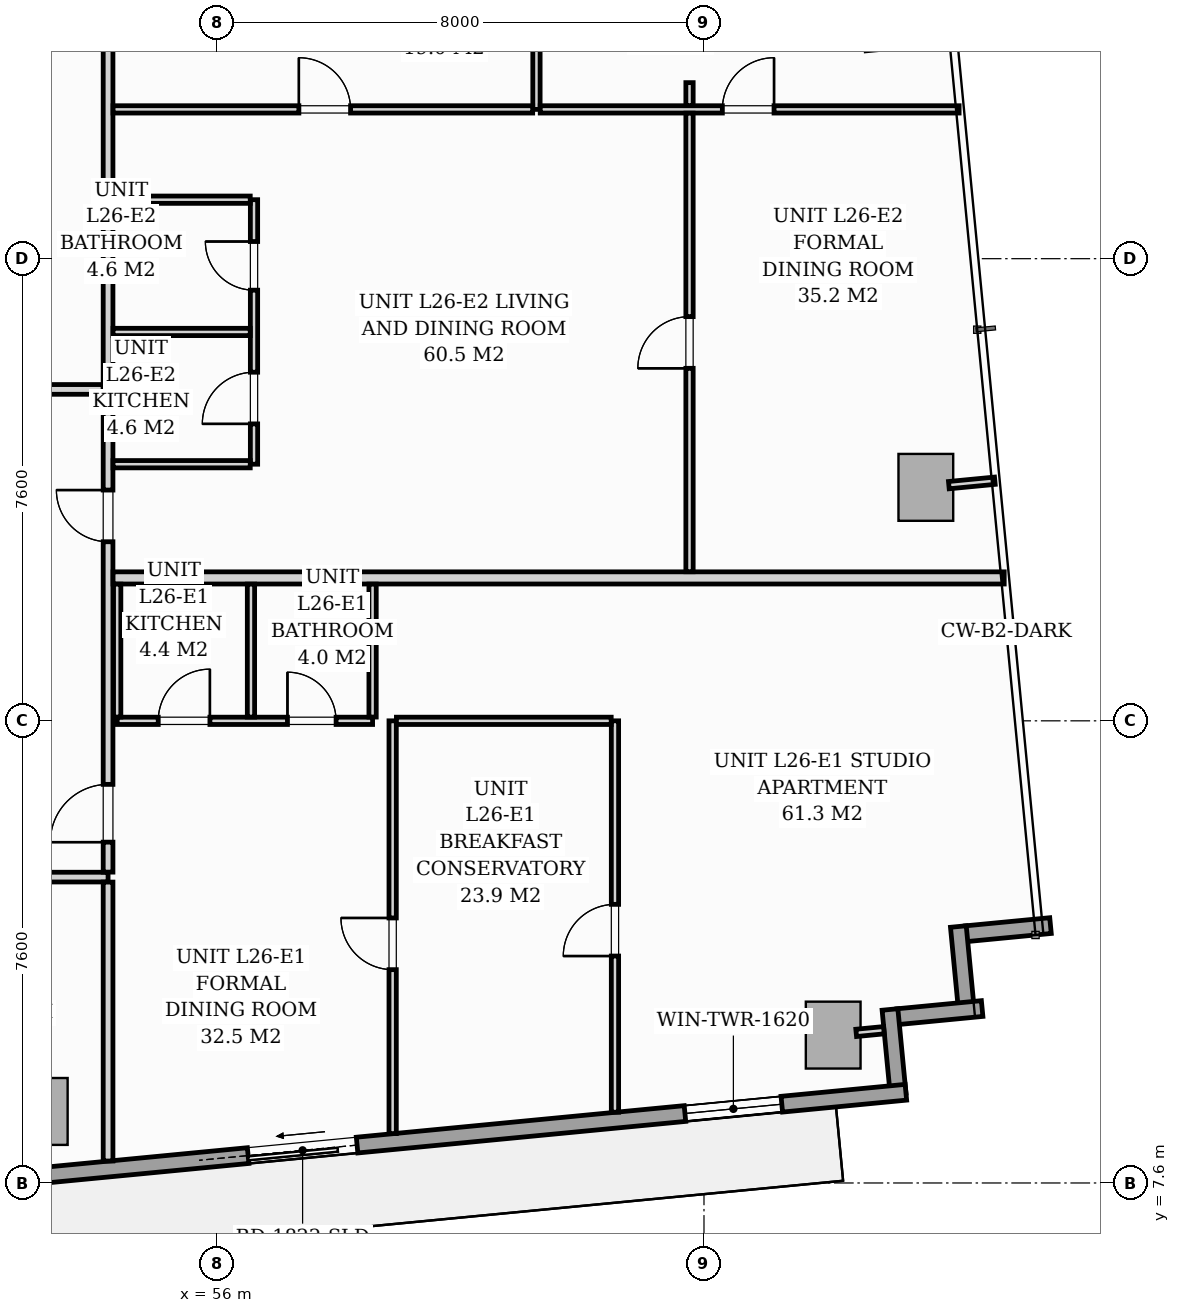
"""IFC4 building model, lengths in metres.
Left out: names, types, materials, properties, quantities, classifications, styles, units other than length and angle.
Written with IfcOpenShell. Run it as: python <this file> out.ifc"""

import sys

from ifc_helpers import new_model, si_unit, direction, frame, frame_2d, origin, origin_2d, place, context, subcontext, project, spatial, rectangle, extrude, source, transform, mapped, element, fill, save


model = new_model("IFC4")
c1 = context("Model", 3, precision=1e-05, world=origin(), true_north=direction((0.0, 1.0)))
c2 = subcontext(c1, "Body", "Model", "MODEL_VIEW")
j1 = project(units=[si_unit("LENGTHUNIT", "METRE"), si_unit("PLANEANGLEUNIT", "RADIAN")], contexts=[c1])
p1 = place(None, origin())
s1 = spatial("IfcSite", under=j1, at=p1, CompositionType="ELEMENT")
p2 = place(p1, origin())
s2 = spatial("IfcBuilding", under=s1, at=p2, CompositionType="ELEMENT")
p3 = place(p2, frame((0.0, 0.0, 93.8)))
s3 = spatial("IfcBuildingStorey", under=s2, at=p3, CompositionType="ELEMENT", Elevation=93.8)
m1 = source(origin(), c2, "Body", "SweptSolid", [
    extrude(rectangle(XDim=0.9, YDim=1.1, at=origin_2d()), origin(), (0.0, 0.0, 1.0), 3.196),
])
for number, where, z_axis, x_axis in (
    (1, (53.085, 8.776, 0.002), (0.0, 0.0, 1.0), (0.995, 0.096, 0.0)),
    (2, (66.125, 10.032, 0.002), (0.0, 0.0, 1.0), (0.995, 0.096, 0.0)),
    (3, (67.648, 19.039, 0.002), (0.0, 0.0, 1.0), (0.995, 0.096, 0.0)),
):
    element("IfcColumn", number, at=place(p3, frame(where, z_axis=z_axis, x_axis=x_axis)), inside=s3, PredefinedType="COLUMN", context=c2, shape_type="MappedRepresentation", body=[
        mapped(m1, transform((0.0, 0.0, 0.0), scale=1.0)),
    ])
for number, where, z_axis, x_axis in (
    (4, (69.698, 11.833, 0.0), (0.0, 0.0, 1.0), (-0.995, -0.096, 0.0)),
    (5, (68.183, 11.817, 0.0), (0.0, 0.0, 1.0), (0.096, -0.995, 0.0)),
):
    element("IfcWall", number, at=place(p3, frame(where, z_axis=z_axis, x_axis=x_axis)), inside=s3, PredefinedType="STANDARD", context=c2, shape_type="SweptSolid", body=[
        extrude(rectangle(XDim=1.395, YDim=0.26, at=frame_2d((0.697, 0.0))), origin(), (0.0, 0.0, 1.0), 2.94),
    ])
p4 = place(p3, frame((68.574, 10.469, 0.0), z_axis=(0.0, 0.0, 1.0), x_axis=(-0.99540774648, -0.095725744959, 0.0)))
e6 = element("IfcWall", 6, at=p4, inside=s3, PredefinedType="STANDARD", context=c2, shape_type="SweptSolid", body=[
    extrude(rectangle(XDim=1.395, YDim=0.26, at=frame_2d((0.698, 0.0))), origin(), (0.0, 0.0, 1.0), 2.94),
])
p5 = place(p3, frame((67.059, 10.453, 0.0), z_axis=(0.0, 0.0, 1.0), x_axis=(0.095915846097, -0.995389446633, 0.0)))
e7 = element("IfcWall", 7, at=p5, inside=s3, PredefinedType="STANDARD", context=c2, shape_type="SweptSolid", body=[
    extrude(rectangle(XDim=1.395, YDim=0.26, at=frame_2d((0.697, 0.0))), origin(), (0.0, 0.0, 1.0), 2.94),
])
p6 = place(p3, frame((67.32, 9.092, 0.0), z_axis=(0.0, 0.0, 1.0), x_axis=(-0.995396521236, -0.095842399342, 0.0)))
e8 = element("IfcWall", 8, at=p6, inside=s3, PredefinedType="STANDARD", context=c2, shape_type="SweptSolid", body=[
    extrude(rectangle(XDim=19.11, YDim=0.26, at=frame_2d((9.555, 0.0))), origin(), (0.0, 0.0, 1.0), 2.94),
])
p7 = place(p6, frame((9.067, 0.0, 0.0)))
e9 = element("IfcOpeningElement", 9, at=p7, cuts=e8, PredefinedType="OPENING", context=c2, shape_type="SweptSolid", body=[
    extrude(rectangle(XDim=1.8, YDim=2.06, at=frame_2d((0.9, 1.03))), frame((0.0, 0.14, 0.0), z_axis=(0.0, -1.0, 0.0), x_axis=(1.0, 0.0, 0.0)), (0.0, 0.0, 1.0), 0.28),
])
p8 = place(p6, frame((2.05, 0.0, 0.65)))
e10 = element("IfcOpeningElement", 10, at=p8, cuts=e8, PredefinedType="OPENING", context=c2, shape_type="SweptSolid", body=[
    extrude(rectangle(XDim=1.6, YDim=1.5, at=frame_2d((0.8, 0.75))), frame((0.0, 0.14, 0.0), z_axis=(0.0, -1.0, 0.0), x_axis=(1.0, 0.0, 0.0)), (0.0, 0.0, 1.0), 0.28),
])
p9 = place(p6, frame((14.438, 0.0, 0.75)))
e11 = element("IfcOpeningElement", 11, at=p9, cuts=e8, PredefinedType="OPENING", context=c2, shape_type="SweptSolid", body=[
    extrude(rectangle(XDim=1.6, YDim=1.5, at=frame_2d((0.8, 0.75))), frame((0.0, 0.14, 0.0), z_axis=(0.0, -1.0, 0.0), x_axis=(1.0, 0.0, 0.0)), (0.0, 0.0, 1.0), 0.28),
])
p10 = place(p3, frame((16.6, 12.63, 0.0), z_axis=(0.0, 0.0, 1.0), x_axis=(1.0, 0.0, 0.0)))
e12 = element("IfcWall", 12, at=p10, inside=s3, PredefinedType="PARTITIONING", context=c2, shape_type="SweptSolid", body=[
    extrude(rectangle(XDim=37.6, YDim=0.16, at=frame_2d((18.8, 0.0))), origin(), (0.0, 0.0, 1.0), 2.94),
])
p11 = place(p10, frame((1.626, 0.0, 0.0)))
e13 = element("IfcOpeningElement", 13, at=p11, cuts=e12, PredefinedType="OPENING", context=c2, shape_type="SweptSolid", body=[
    extrude(rectangle(XDim=0.95, YDim=2.06, at=frame_2d((0.475, 1.03))), frame((0.0, 0.09, 0.0), z_axis=(0.0, -1.0, 0.0), x_axis=(1.0, 0.0, 0.0)), (0.0, 0.0, 1.0), 0.18),
])
p12 = place(p10, frame((13.46, 0.0, 0.0)))
e14 = element("IfcOpeningElement", 14, at=p12, cuts=e12, PredefinedType="OPENING", context=c2, shape_type="SweptSolid", body=[
    extrude(rectangle(XDim=0.95, YDim=2.06, at=frame_2d((0.475, 1.03))), frame((0.0, 0.09, 0.0), z_axis=(0.0, -1.0, 0.0), x_axis=(1.0, 0.0, 0.0)), (0.0, 0.0, 1.0), 0.18),
])
p13 = place(p10, frame((26.522, 0.0, 0.0)))
e15 = element("IfcOpeningElement", 15, at=p13, cuts=e12, PredefinedType="OPENING", context=c2, shape_type="SweptSolid", body=[
    extrude(rectangle(XDim=0.95, YDim=2.06, at=frame_2d((0.475, 1.03))), frame((0.0, 0.09, 0.0), z_axis=(0.0, -1.0, 0.0), x_axis=(1.0, 0.0, 0.0)), (0.0, 0.0, 1.0), 0.18),
])
p14 = place(p3, frame((54.2, 7.961, 0.0), z_axis=(0.0, 0.0, 1.0), x_axis=(0.0, 1.0, 0.0)))
e16 = element("IfcWall", 16, at=p14, inside=s3, PredefinedType="PARTITIONING", context=c2, shape_type="SweptSolid", body=[
    extrude(rectangle(XDim=4.587, YDim=0.16, at=frame_2d((2.293, 0.0))), origin(), (0.0, 0.0, 1.0), 2.94),
])
p15 = place(p3, frame((54.2, 12.712, 0.0), z_axis=(0.0, 0.0, 1.0), x_axis=(0.0, 1.0, 0.0)))
e17 = element("IfcWall", 17, at=p15, inside=s3, PredefinedType="PARTITIONING", context=c2, shape_type="SweptSolid", body=[
    extrude(rectangle(XDim=14.815, YDim=0.16, at=frame_2d((7.408, 0.0))), origin(), (0.0, 0.0, 1.0), 2.94),
])
p16 = place(p15, frame((0.493, 0.0, 0.0)))
e18 = element("IfcOpeningElement", 18, at=p16, cuts=e17, PredefinedType="OPENING", context=c2, shape_type="SweptSolid", body=[
    extrude(rectangle(XDim=0.95, YDim=2.06, at=frame_2d((0.475, 1.03))), frame((0.0, 0.09, 0.0), z_axis=(0.0, -1.0, 0.0), x_axis=(1.0, 0.0, 0.0)), (0.0, 0.0, 1.0), 0.18),
])
p17 = place(p15, frame((5.433, 0.0, 0.0)))
e19 = element("IfcOpeningElement", 19, at=p17, cuts=e17, PredefinedType="OPENING", context=c2, shape_type="SweptSolid", body=[
    extrude(rectangle(XDim=0.85, YDim=2.0, at=frame_2d((0.425, 1.0))), frame((0.0, 0.09, 0.0), z_axis=(0.0, -1.0, 0.0), x_axis=(1.0, 0.0, 0.0)), (0.0, 0.0, 1.0), 0.18),
])
p18 = place(p3, frame((54.282, 17.55, 0.0), z_axis=(0.0, 0.0, 1.0), x_axis=(1.0, 0.0, 0.0)))
e20 = element("IfcWall", 20, at=p18, inside=s3, PredefinedType="PARTITIONING", context=c2, shape_type="SweptSolid", body=[
    extrude(rectangle(XDim=14.655, YDim=0.2, at=frame_2d((7.328, 0.0))), origin(), (0.0, 0.0, 1.0), 2.94),
])
p19 = place(p3, frame((54.35, 15.2, 0.0), z_axis=(0.0, 0.0, 1.0), x_axis=(1.0, 0.0, 0.0)))
e21 = element("IfcWall", 21, at=p19, inside=s3, PredefinedType="PARTITIONING", context=c2, shape_type="SweptSolid", body=[
    extrude(rectangle(XDim=4.2, YDim=0.12, at=frame_2d((2.1, 0.0))), origin(), (0.0, 0.0, 1.0), 2.94),
])
p20 = place(p19, frame((0.675, 0.0, 0.0)))
e22 = element("IfcOpeningElement", 22, at=p20, cuts=e21, PredefinedType="OPENING", context=c2, shape_type="SweptSolid", body=[
    extrude(rectangle(XDim=0.85, YDim=2.05, at=frame_2d((0.425, 1.025))), frame((0.0, 0.07, 0.0), z_axis=(0.0, -1.0, 0.0), x_axis=(1.0, 0.0, 0.0)), (0.0, 0.0, 1.0), 0.14),
])
p21 = place(p19, frame((2.8, 0.0, 0.0)))
e23 = element("IfcOpeningElement", 23, at=p21, cuts=e21, PredefinedType="OPENING", context=c2, shape_type="SweptSolid", body=[
    extrude(rectangle(XDim=0.8, YDim=2.02, at=frame_2d((0.4, 1.01))), frame((0.0, 0.07, 0.0), z_axis=(0.0, -1.0, 0.0), x_axis=(1.0, 0.0, 0.0)), (0.0, 0.0, 1.0), 0.14),
])
for number, where, z_axis, x_axis in (
    (24, (54.35, 15.262, 0.0), (0.0, 0.0, 1.0), (0.0, 1.0, 0.0)),
    (25, (56.55, 15.262, 0.0), (0.0, 0.0, 1.0), (0.0, 1.0, 0.0)),
    (26, (58.55, 15.262, 0.0), (0.0, 0.0, 1.0), (0.0, 1.0, 0.0)),
):
    element("IfcWall", number, at=place(p3, frame(where, z_axis=z_axis, x_axis=x_axis)), inside=s3, PredefinedType="PARTITIONING", context=c2, shape_type="SweptSolid", body=[
        extrude(rectangle(XDim=2.186, YDim=0.12, at=frame_2d((1.093, 0.0))), origin(), (0.0, 0.0, 1.0), 2.94),
    ])
p22 = place(p3, frame((58.88, 8.412, 0.0), z_axis=(0.0, 0.0, 1.0), x_axis=(0.0, 1.0, 0.0)))
e27 = element("IfcWall", 27, at=p22, inside=s3, PredefinedType="PARTITIONING", context=c2, shape_type="SweptSolid", body=[
    extrude(rectangle(XDim=6.788, YDim=0.12, at=frame_2d((3.394, 0.0))), origin(), (0.0, 0.0, 1.0), 2.94),
])
p23 = place(p22, frame((2.696, 0.0, 0.0)))
e28 = element("IfcOpeningElement", 28, at=p23, cuts=e27, PredefinedType="OPENING", context=c2, shape_type="SweptSolid", body=[
    extrude(rectangle(XDim=0.85, YDim=2.05, at=frame_2d((0.425, 1.025))), frame((0.0, 0.07, 0.0), z_axis=(0.0, -1.0, 0.0), x_axis=(1.0, 0.0, 0.0)), (0.0, 0.0, 1.0), 0.14),
])
p24 = place(p3, frame((62.536, 8.764, 0.0), z_axis=(0.0, 0.0, 1.0), x_axis=(0.0, 1.0, 0.0)))
e29 = element("IfcWall", 29, at=p24, inside=s3, PredefinedType="PARTITIONING", context=c2, shape_type="SweptSolid", body=[
    extrude(rectangle(XDim=6.436, YDim=0.12, at=frame_2d((3.218, 0.0))), origin(), (0.0, 0.0, 1.0), 2.94),
])
p25 = place(p24, frame((2.568, 0.0, 0.0)))
e30 = element("IfcOpeningElement", 30, at=p25, cuts=e29, PredefinedType="OPENING", context=c2, shape_type="SweptSolid", body=[
    extrude(rectangle(XDim=0.85, YDim=2.05, at=frame_2d((0.425, 1.025))), frame((0.0, 0.07, 0.0), z_axis=(0.0, -1.0, 0.0), x_axis=(1.0, 0.0, 0.0)), (0.0, 0.0, 1.0), 0.14),
])
p26 = place(p3, frame((58.942, 15.2, 0.0), z_axis=(0.0, 0.0, 1.0), x_axis=(1.0, 0.0, 0.0)))
e31 = element("IfcWall", 31, at=p26, inside=s3, PredefinedType="PARTITIONING", context=c2, shape_type="SweptSolid", body=[
    extrude(rectangle(XDim=3.532, YDim=0.12, at=frame_2d((1.766, 0.0))), origin(), (0.0, 0.0, 1.0), 2.94),
])
p27 = place(p3, frame((56.6, 19.42, 0.0), z_axis=(0.0, 0.0, 1.0), x_axis=(0.0, 1.0, 0.0)))
e32 = element("IfcWall", 32, at=p27, inside=s3, PredefinedType="PARTITIONING", context=c2, shape_type="SweptSolid", body=[
    extrude(rectangle(XDim=4.35, YDim=0.12, at=frame_2d((2.175, 0.0))), origin(), (0.0, 0.0, 1.0), 2.94),
])
p28 = place(p27, frame((0.663, 0.0, 0.0)))
e33 = element("IfcOpeningElement", 33, at=p28, cuts=e32, PredefinedType="OPENING", context=c2, shape_type="SweptSolid", body=[
    extrude(rectangle(XDim=0.85, YDim=2.05, at=frame_2d((0.425, 1.025))), frame((0.0, 0.07, 0.0), z_axis=(0.0, -1.0, 0.0), x_axis=(1.0, 0.0, 0.0)), (0.0, 0.0, 1.0), 0.14),
])
p29 = place(p27, frame((2.862, 0.0, 0.0)))
e34 = element("IfcOpeningElement", 34, at=p29, cuts=e32, PredefinedType="OPENING", context=c2, shape_type="SweptSolid", body=[
    extrude(rectangle(XDim=0.8, YDim=2.02, at=frame_2d((0.4, 1.01))), frame((0.0, 0.07, 0.0), z_axis=(0.0, -1.0, 0.0), x_axis=(1.0, 0.0, 0.0)), (0.0, 0.0, 1.0), 0.14),
])
for number, where, z_axis, x_axis in (
    (35, (54.282, 21.595, 0.0), (0.0, 0.0, 1.0), (1.0, 0.0, 0.0)),
    (36, (54.282, 19.42, 0.0), (0.0, 0.0, 1.0), (1.0, 0.0, 0.0)),
    (37, (54.282, 23.77, 0.0), (0.0, 0.0, 1.0), (1.0, 0.0, 0.0)),
):
    element("IfcWall", number, at=place(p3, frame(where, z_axis=z_axis, x_axis=x_axis)), inside=s3, PredefinedType="PARTITIONING", context=c2, shape_type="SweptSolid", body=[
        extrude(rectangle(XDim=2.256, YDim=0.12, at=frame_2d((1.128, 0.0))), origin(), (0.0, 0.0, 1.0), 2.94),
    ])
p30 = place(p3, frame((61.245, 25.255, 0.0), z_axis=(0.0, 0.0, 1.0), x_axis=(0.0, 1.0, 0.0)))
e38 = element("IfcWall", 38, at=p30, inside=s3, PredefinedType="PARTITIONING", context=c2, shape_type="SweptSolid", body=[
    extrude(rectangle(XDim=2.951, YDim=0.12, at=frame_2d((1.476, 0.0))), origin(), (0.0, 0.0, 1.0), 2.94),
])
p31 = place(p3, frame((54.282, 25.255, 0.0), z_axis=(0.0, 0.0, 1.0), x_axis=(1.0, 0.0, 0.0)))
e39 = element("IfcWall", 39, at=p31, inside=s3, PredefinedType="PARTITIONING", context=c2, shape_type="SweptSolid", body=[
    extrude(rectangle(XDim=6.901, YDim=0.12, at=frame_2d((3.451, 0.0))), origin(), (0.0, 0.0, 1.0), 2.94),
])
p32 = place(p31, frame((3.056, 0.0, 0.0)))
e40 = element("IfcOpeningElement", 40, at=p32, cuts=e39, PredefinedType="OPENING", context=c2, shape_type="SweptSolid", body=[
    extrude(rectangle(XDim=0.85, YDim=2.05, at=frame_2d((0.425, 1.025))), frame((0.0, 0.07, 0.0), z_axis=(0.0, -1.0, 0.0), x_axis=(1.0, 0.0, 0.0)), (0.0, 0.0, 1.0), 0.14),
])
p33 = place(p3, frame((61.307, 25.255, 0.0), z_axis=(0.0, 0.0, 1.0), x_axis=(1.0, 0.0, 0.0)))
e41 = element("IfcWall", 41, at=p33, inside=s3, PredefinedType="PARTITIONING", context=c2, shape_type="SweptSolid", body=[
    extrude(rectangle(XDim=6.888, YDim=0.12, at=frame_2d((3.444, 0.0))), origin(), (0.0, 0.0, 1.0), 2.94),
])
p34 = place(p33, frame((2.995, 0.0, 0.0)))
e42 = element("IfcOpeningElement", 42, at=p34, cuts=e41, PredefinedType="OPENING", context=c2, shape_type="SweptSolid", body=[
    extrude(rectangle(XDim=0.85, YDim=2.05, at=frame_2d((0.425, 1.025))), frame((0.0, 0.07, 0.0), z_axis=(0.0, -1.0, 0.0), x_axis=(1.0, 0.0, 0.0)), (0.0, 0.0, 1.0), 0.14),
])
p35 = place(p3, frame((63.762, 17.652, 0.0), z_axis=(0.0, 0.0, 1.0), x_axis=(0.0, 1.0, 0.0)))
e43 = element("IfcWall", 43, at=p35, inside=s3, PredefinedType="PARTITIONING", context=c2, shape_type="SweptSolid", body=[
    extrude(rectangle(XDim=7.541, YDim=0.12, at=frame_2d((3.771, 0.0))), origin(), (0.0, 0.0, 1.0), 2.94),
])
p36 = place(p35, frame((3.345, 0.0, 0.0)))
e44 = element("IfcOpeningElement", 44, at=p36, cuts=e43, PredefinedType="OPENING", context=c2, shape_type="SweptSolid", body=[
    extrude(rectangle(XDim=0.85, YDim=2.05, at=frame_2d((0.425, 1.025))), frame((0.0, 0.07, 0.0), z_axis=(0.0, -1.0, 0.0), x_axis=(1.0, 0.0, 0.0)), (0.0, 0.0, 1.0), 0.14),
])
p37 = place(p3, frame((63.762, 25.317, 0.0), z_axis=(0.0, 0.0, 1.0), x_axis=(0.0, 1.0, 0.0)))
e45 = element("IfcWall", 45, at=p37, inside=s3, PredefinedType="PARTITIONING", context=c2, shape_type="SweptSolid", body=[
    extrude(rectangle(XDim=0.378, YDim=0.12, at=frame_2d((0.189, 0.0))), origin(), (0.0, 0.0, 1.0), 2.94),
])
p38 = place(p3, frame((52.332, 20.65, 0.0), z_axis=(0.0, 0.0, 1.0), x_axis=(1.0, 0.0, 0.0)))
e46 = element("IfcWall", 46, at=p38, inside=s3, PredefinedType="PARTITIONING", context=c2, shape_type="SweptSolid", body=[
    extrude(rectangle(XDim=1.786, YDim=0.16, at=frame_2d((0.893, 0.0))), origin(), (0.0, 0.0, 1.0), 2.94),
])
p39 = place(p3, frame((66.503, 10.068, 0.0), z_axis=(0.0, 0.0, 1.0), x_axis=(0.995389482415, 0.095915474751, 0.0)))
e47 = element("IfcWall", 47, at=p39, inside=s3, PredefinedType="PARTITIONING", context=c2, shape_type="SweptSolid", body=[
    extrude(rectangle(XDim=0.458, YDim=0.12, at=frame_2d((0.229, 0.0))), origin(), (0.0, 0.0, 1.0), 2.94),
])
p40 = place(p3, frame((68.027, 19.076, 0.0), z_axis=(0.0, 0.0, 1.0), x_axis=(0.995377786728, 0.096036772582, 0.0)))
e48 = element("IfcWall", 48, at=p40, inside=s3, PredefinedType="PARTITIONING", context=c2, shape_type="SweptSolid", body=[
    extrude(rectangle(XDim=0.76, YDim=0.12, at=frame_2d((0.38, 0.0))), origin(), (0.0, 0.0, 1.0), 2.94),
])
m2 = source(origin(), c2, "Body", "SweptSolid", [
    extrude(rectangle(XDim=1.8, YDim=2.06, at=frame_2d((0.9, 1.03))), frame((0.0, 0.025, 0.0), z_axis=(0.0, -1.0, 0.0), x_axis=(1.0, 0.0, 0.0)), (0.0, 0.0, 1.0), 0.05),
])
p41 = place(p7, origin())
e49 = element("IfcDoor", 49, at=p41, inside=s3, OperationType="SLIDING_TO_RIGHT", PredefinedType="DOOR", context=c2, shape_type="MappedRepresentation", body=[
    mapped(m2, transform((0.0, 0.0, 0.0), scale=1.0)),
])
fill(e9, e49)
m3 = source(origin(), c2, "Body", "SweptSolid", [
    extrude(rectangle(XDim=1.6, YDim=1.5, at=frame_2d((0.8, 0.75))), frame((0.0, 0.03, 0.0), z_axis=(0.0, -1.0, 0.0), x_axis=(1.0, 0.0, 0.0)), (0.0, 0.0, 1.0), 0.06),
])
p42 = place(p8, origin())
e50 = element("IfcWindow", 50, at=p42, inside=s3, PartitioningType="SINGLE_PANEL", PredefinedType="WINDOW", context=c2, shape_type="MappedRepresentation", body=[
    mapped(m3, transform((0.0, 0.0, 0.0), scale=1.0)),
])
fill(e10, e50)
m4 = source(origin(), c2, "Body", "SweptSolid", [
    extrude(rectangle(XDim=0.95, YDim=2.06, at=frame_2d((0.475, 1.03))), frame((0.0, 0.025, 0.0), z_axis=(0.0, -1.0, 0.0), x_axis=(1.0, 0.0, 0.0)), (0.0, 0.0, 1.0), 0.05),
])
p43 = place(p16, origin())
e51 = element("IfcDoor", 51, at=p43, inside=s3, OperationType="SINGLE_SWING_LEFT", PredefinedType="DOOR", context=c2, shape_type="MappedRepresentation", body=[
    mapped(m4, transform((0.0, 0.0, 0.0), scale=1.0)),
])
fill(e18, e51)
m5 = source(origin(), c2, "Body", "SweptSolid", [
    extrude(rectangle(XDim=0.85, YDim=2.05, at=frame_2d((0.425, 1.025))), frame((0.0, 0.025, 0.0), z_axis=(0.0, -1.0, 0.0), x_axis=(1.0, 0.0, 0.0)), (0.0, 0.0, 1.0), 0.05),
])
p44 = place(p23, origin())
e52 = element("IfcDoor", 52, at=p44, inside=s3, OperationType="SINGLE_SWING_RIGHT", PredefinedType="DOOR", context=c2, shape_type="MappedRepresentation", body=[
    mapped(m5, transform((0.0, 0.0, 0.0), scale=1.0)),
])
fill(e28, e52)
p45 = place(p25, origin())
e53 = element("IfcDoor", 53, at=p45, inside=s3, OperationType="SINGLE_SWING_LEFT", PredefinedType="DOOR", context=c2, shape_type="MappedRepresentation", body=[
    mapped(m5, transform((0.0, 0.0, 0.0), scale=1.0)),
])
fill(e30, e53)
p46 = place(p20, origin())
e54 = element("IfcDoor", 54, at=p46, inside=s3, OperationType="SINGLE_SWING_RIGHT", PredefinedType="DOOR", context=c2, shape_type="MappedRepresentation", body=[
    mapped(m5, transform((0.0, 0.0, 0.0), scale=1.0)),
])
fill(e22, e54)
m6 = source(origin(), c2, "Body", "SweptSolid", [
    extrude(rectangle(XDim=0.8, YDim=2.02, at=frame_2d((0.4, 1.01))), frame((0.0, 0.025, 0.0), z_axis=(0.0, -1.0, 0.0), x_axis=(1.0, 0.0, 0.0)), (0.0, 0.0, 1.0), 0.05),
])
p47 = place(p21, origin())
e55 = element("IfcDoor", 55, at=p47, inside=s3, OperationType="SINGLE_SWING_LEFT", PredefinedType="DOOR", context=c2, shape_type="MappedRepresentation", body=[
    mapped(m6, transform((0.0, 0.0, 0.0), scale=1.0)),
])
fill(e23, e55)
m7 = source(origin(), c2, "Body", "SweptSolid", [
    extrude(rectangle(XDim=0.85, YDim=2.0, at=frame_2d((0.425, 1.0))), frame((0.0, 0.025, 0.0), z_axis=(0.0, -1.0, 0.0), x_axis=(1.0, 0.0, 0.0)), (0.0, 0.0, 1.0), 0.05),
])
p48 = place(p17, origin())
e56 = element("IfcDoor", 56, at=p48, inside=s3, OperationType="SINGLE_SWING_RIGHT", PredefinedType="DOOR", context=c2, shape_type="MappedRepresentation", body=[
    mapped(m7, transform((0.0, 0.0, 0.0), scale=1.0)),
])
fill(e19, e56)
p49 = place(p28, origin())
e57 = element("IfcDoor", 57, at=p49, inside=s3, OperationType="SINGLE_SWING_LEFT", PredefinedType="DOOR", context=c2, shape_type="MappedRepresentation", body=[
    mapped(m5, transform((0.0, 0.0, 0.0), scale=1.0)),
])
fill(e33, e57)
p50 = place(p29, origin())
e58 = element("IfcDoor", 58, at=p50, inside=s3, OperationType="SINGLE_SWING_RIGHT", PredefinedType="DOOR", context=c2, shape_type="MappedRepresentation", body=[
    mapped(m6, transform((0.0, 0.0, 0.0), scale=1.0)),
])
fill(e34, e58)
p51 = place(p32, origin())
e59 = element("IfcDoor", 59, at=p51, inside=s3, OperationType="SINGLE_SWING_LEFT", PredefinedType="DOOR", context=c2, shape_type="MappedRepresentation", body=[
    mapped(m5, transform((0.0, 0.0, 0.0), scale=1.0)),
])
fill(e40, e59)
p52 = place(p34, origin())
e60 = element("IfcDoor", 60, at=p52, inside=s3, OperationType="SINGLE_SWING_RIGHT", PredefinedType="DOOR", context=c2, shape_type="MappedRepresentation", body=[
    mapped(m5, transform((0.0, 0.0, 0.0), scale=1.0)),
])
fill(e42, e60)
p53 = place(p36, origin())
e61 = element("IfcDoor", 61, at=p53, inside=s3, OperationType="SINGLE_SWING_LEFT", PredefinedType="DOOR", context=c2, shape_type="MappedRepresentation", body=[
    mapped(m5, transform((0.0, 0.0, 0.0), scale=1.0)),
])
fill(e44, e61)
save(model, sys.argv[1])
